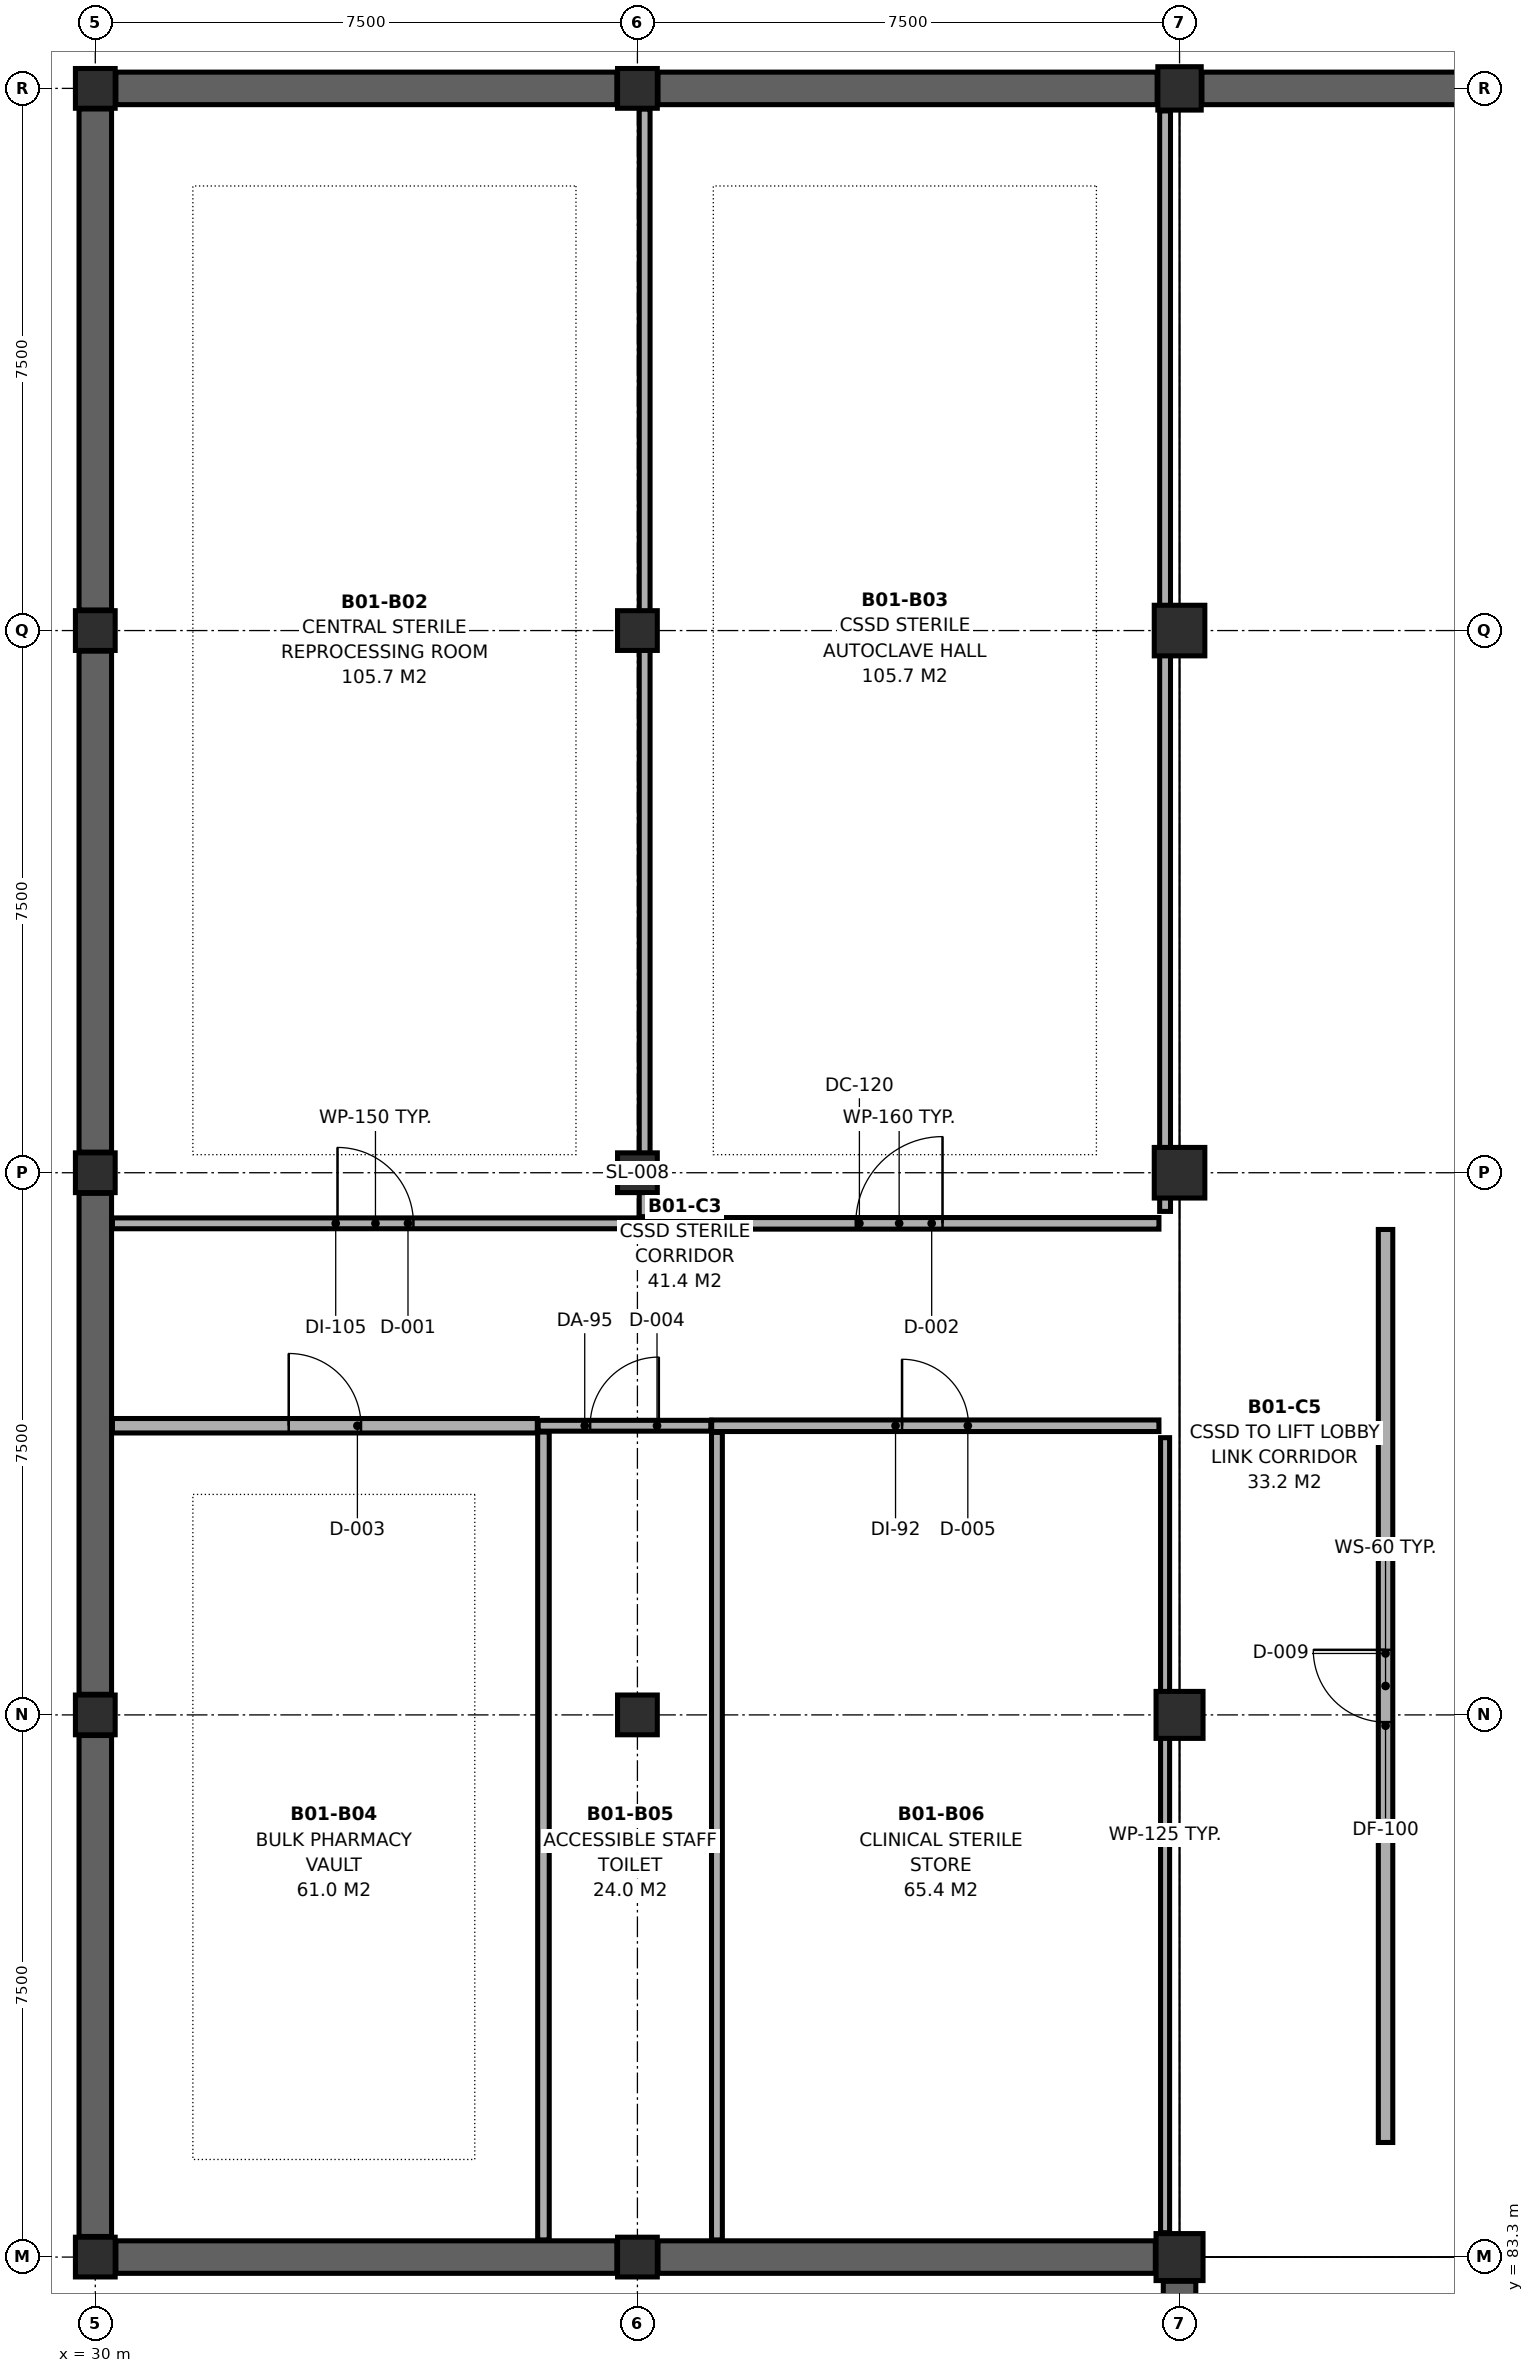
"""IFC4 building model, lengths in metres.
Left out: names, types, materials, properties, quantities, classifications, styles, units other than length and angle.
Written with IfcOpenShell. Run it as: python <this file> out.ifc"""

import sys

from ifc_helpers import new_model, si_unit, direction, frame, frame_2d, origin, origin_2d, place, context, subcontext, project, spatial, rectangle, extrude, element, fill, save


model = new_model("IFC4")
c1 = context("Model", 3, precision=1e-05, world=origin(), true_north=direction((0.0, 1.0)))
c2 = subcontext(c1, "Body", "Model", "MODEL_VIEW")
j1 = project(units=[si_unit("LENGTHUNIT", "METRE"), si_unit("PLANEANGLEUNIT", "RADIAN")], contexts=[c1])
p1 = place(None, origin())
s1 = spatial("IfcSite", under=j1, at=p1, CompositionType="ELEMENT")
p2 = place(p1, origin())
s2 = spatial("IfcBuilding", under=s1, at=p2, CompositionType="ELEMENT")
p3 = place(p2, frame((0.0, 0.0, -4.2)))
s3 = spatial("IfcBuildingStorey", under=s2, at=p3, CompositionType="ELEMENT", Elevation=-4.2)
for number, where, z_axis, x_axis in (
    (1, (30.0, 83.3, 0.0), (0.0, 0.0, 1.0), (1.0, 0.0, 0.0)),
    (2, (30.0, 90.8, 0.0), (0.0, 0.0, 1.0), (1.0, 0.0, 0.0)),
    (3, (30.0, 98.3, 0.0), (0.0, 0.0, 1.0), (1.0, 0.0, 0.0)),
    (4, (30.0, 105.8, 0.0), (0.0, 0.0, 1.0), (1.0, 0.0, 0.0)),
    (5, (30.0, 113.3, 0.0), (0.0, 0.0, 1.0), (1.0, 0.0, 0.0)),
    (6, (37.5, 83.3, 0.0), (0.0, 0.0, 1.0), (1.0, 0.0, 0.0)),
    (7, (37.5, 90.8, 0.0), (0.0, 0.0, 1.0), (1.0, 0.0, 0.0)),
    (8, (37.5, 98.3, 0.0), (0.0, 0.0, 1.0), (1.0, 0.0, 0.0)),
    (9, (37.5, 105.8, 0.0), (0.0, 0.0, 1.0), (1.0, 0.0, 0.0)),
    (10, (37.5, 113.3, 0.0), (0.0, 0.0, 1.0), (1.0, 0.0, 0.0)),
):
    element("IfcColumn", number, at=place(p3, frame(where, z_axis=z_axis, x_axis=x_axis)), inside=s3, PredefinedType="COLUMN", context=c2, shape_type="SweptSolid", body=[
        extrude(rectangle(XDim=0.55, YDim=0.55, at=origin_2d()), origin(), (0.0, 0.0, 1.0), 3.78),
    ])
for number, where, z_axis, x_axis in (
    (11, (45.0, 83.3, 0.0), (0.0, 0.0, 1.0), (1.0, 0.0, 0.0)),
    (12, (45.0, 90.8, 0.0), (0.0, 0.0, 1.0), (1.0, 0.0, 0.0)),
):
    element("IfcColumn", number, at=place(p3, frame(where, z_axis=z_axis, x_axis=x_axis)), inside=s3, PredefinedType="COLUMN", context=c2, shape_type="SweptSolid", body=[
        extrude(rectangle(XDim=0.65, YDim=0.65, at=origin_2d()), origin(), (0.0, 0.0, 1.0), 3.78),
    ])
for number, where, z_axis, x_axis in (
    (13, (45.0, 98.3, 0.0), (0.0, 0.0, 1.0), (1.0, 0.0, 0.0)),
    (14, (45.0, 105.8, 0.0), (0.0, 0.0, 1.0), (1.0, 0.0, 0.0)),
):
    element("IfcColumn", number, at=place(p3, frame(where, z_axis=z_axis, x_axis=x_axis)), inside=s3, PredefinedType="COLUMN", context=c2, shape_type="SweptSolid", body=[
        extrude(rectangle(XDim=0.7, YDim=0.7, at=origin_2d()), origin(), (0.0, 0.0, 1.0), 3.78),
    ])
p4 = place(p3, frame((45.0, 113.3, 0.0), z_axis=(0.0, 0.0, 1.0), x_axis=(1.0, 0.0, 0.0)))
e15 = element("IfcColumn", 15, at=p4, inside=s3, PredefinedType="COLUMN", context=c2, shape_type="SweptSolid", body=[
    extrude(rectangle(XDim=0.6, YDim=0.6, at=origin_2d()), origin(), (0.0, 0.0, 1.0), 3.78),
])
p5 = place(p3, frame((45.0, 76.11, 0.0), z_axis=(0.0, 0.0, 1.0), x_axis=(0.0, 1.0, 0.0)))
e16 = element("IfcWall", 16, at=p5, inside=s3, PredefinedType="USERDEFINED", context=c2, shape_type="SweptSolid", body=[
    extrude(rectangle(XDim=6.855, YDim=0.45, at=frame_2d((3.427, 0.0))), origin(), (0.0, 0.0, 1.0), 3.13),
])
p6 = place(p3, frame((44.665, 83.3, 0.0), z_axis=(0.0, 0.0, 1.0), x_axis=(-1.0, 0.0, 0.0)))
e17 = element("IfcWall", 17, at=p6, inside=s3, PredefinedType="USERDEFINED", context=c2, shape_type="SweptSolid", body=[
    extrude(rectangle(XDim=6.88, YDim=0.45, at=frame_2d((3.44, 0.0))), origin(), (0.0, 0.0, 1.0), 3.13),
])
p7 = place(p3, frame((37.215, 83.3, 0.0), z_axis=(0.0, 0.0, 1.0), x_axis=(-1.0, 0.0, 0.0)))
e18 = element("IfcWall", 18, at=p7, inside=s3, PredefinedType="USERDEFINED", context=c2, shape_type="SweptSolid", body=[
    extrude(rectangle(XDim=6.93, YDim=0.45, at=frame_2d((3.465, 0.0))), origin(), (0.0, 0.0, 1.0), 3.13),
])
for number, where, z_axis, x_axis in (
    (19, (30.0, 83.585, 0.0), (0.0, 0.0, 1.0), (0.0, 1.0, 0.0)),
    (20, (30.0, 91.085, 0.0), (0.0, 0.0, 1.0), (0.0, 1.0, 0.0)),
    (21, (30.0, 98.585, 0.0), (0.0, 0.0, 1.0), (0.0, 1.0, 0.0)),
    (22, (30.0, 106.085, 0.0), (0.0, 0.0, 1.0), (0.0, 1.0, 0.0)),
):
    element("IfcWall", number, at=place(p3, frame(where, z_axis=z_axis, x_axis=x_axis)), inside=s3, PredefinedType="USERDEFINED", context=c2, shape_type="SweptSolid", body=[
        extrude(rectangle(XDim=6.93, YDim=0.45, at=frame_2d((3.465, 0.0))), origin(), (0.0, 0.0, 1.0), 3.13),
    ])
p8 = place(p3, frame((30.285, 113.3, 0.0), z_axis=(0.0, 0.0, 1.0), x_axis=(1.0, 0.0, 0.0)))
e23 = element("IfcWall", 23, at=p8, inside=s3, PredefinedType="USERDEFINED", context=c2, shape_type="SweptSolid", body=[
    extrude(rectangle(XDim=6.93, YDim=0.45, at=frame_2d((3.465, 0.0))), origin(), (0.0, 0.0, 1.0), 3.13),
])
p9 = place(p3, frame((37.785, 113.3, 0.0), z_axis=(0.0, 0.0, 1.0), x_axis=(1.0, 0.0, 0.0)))
e24 = element("IfcWall", 24, at=p9, inside=s3, PredefinedType="USERDEFINED", context=c2, shape_type="SweptSolid", body=[
    extrude(rectangle(XDim=6.905, YDim=0.45, at=frame_2d((3.453, 0.0))), origin(), (0.0, 0.0, 1.0), 3.13),
])
p10 = place(p3, frame((45.31, 113.3, 0.0), z_axis=(0.0, 0.0, 1.0), x_axis=(1.0, 0.0, 0.0)))
e25 = element("IfcWall", 25, at=p10, inside=s3, PredefinedType="USERDEFINED", context=c2, shape_type="SweptSolid", body=[
    extrude(rectangle(XDim=6.88, YDim=0.45, at=frame_2d((3.44, 0.0))), origin(), (0.0, 0.0, 1.0), 3.13),
])
p11 = place(p3, frame((47.85, 84.885, 0.0), z_axis=(0.0, 0.0, 1.0), x_axis=(0.0, 1.0, 0.0)))
e26 = element("IfcWall", 26, at=p11, inside=s3, PredefinedType="PARTITIONING", context=c2, shape_type="SweptSolid", body=[
    extrude(rectangle(XDim=12.63, YDim=0.2, at=frame_2d((6.315, 0.0))), origin(), (0.0, 0.0, 1.0), 3.065),
])
p12 = place(p11, frame((5.815, 0.0, 0.0)))
e27 = element("IfcOpeningElement", 27, at=p12, cuts=e26, PredefinedType="OPENING", context=c2, shape_type="SweptSolid", body=[
    extrude(rectangle(XDim=1.0, YDim=2.15, at=frame_2d((0.5, 1.075))), frame((0.0, 0.112, 0.0), z_axis=(0.0, -1.0, 0.0), x_axis=(1.0, 0.0, 0.0)), (0.0, 0.0, 1.0), 0.224),
])
p13 = place(p3, frame((30.237, 97.6, 0.0), z_axis=(0.0, 0.0, 1.0), x_axis=(1.0, 0.0, 0.0)))
e28 = element("IfcWall", 28, at=p13, inside=s3, PredefinedType="PARTITIONING", context=c2, shape_type="SweptSolid", body=[
    extrude(rectangle(XDim=7.278, YDim=0.15, at=frame_2d((3.639, 0.0))), origin(), (0.0, 0.0, 1.0), 3.065),
])
p14 = place(p13, frame((3.114, 0.0, 0.0)))
e29 = element("IfcOpeningElement", 29, at=p14, cuts=e28, PredefinedType="OPENING", context=c2, shape_type="SweptSolid", body=[
    extrude(rectangle(XDim=1.05, YDim=2.15, at=frame_2d((0.525, 1.075))), frame((0.0, 0.087, 0.0), z_axis=(0.0, -1.0, 0.0), x_axis=(1.0, 0.0, 0.0)), (0.0, 0.0, 1.0), 0.174),
])
p15 = place(p3, frame((37.527, 97.6, 0.0), z_axis=(0.0, 0.0, 1.0), x_axis=(1.0, 0.0, 0.0)))
e30 = element("IfcWall", 30, at=p15, inside=s3, PredefinedType="PARTITIONING", context=c2, shape_type="SweptSolid", body=[
    extrude(rectangle(XDim=7.188, YDim=0.16, at=frame_2d((3.594, 0.0))), origin(), (0.0, 0.0, 1.0), 3.065),
])
p16 = place(p15, frame((2.994, 0.0, 0.0)))
e31 = element("IfcOpeningElement", 31, at=p16, cuts=e30, PredefinedType="OPENING", context=c2, shape_type="SweptSolid", body=[
    extrude(rectangle(XDim=1.2, YDim=2.15, at=frame_2d((0.6, 1.075))), frame((0.0, 0.092, 0.0), z_axis=(0.0, -1.0, 0.0), x_axis=(1.0, 0.0, 0.0)), (0.0, 0.0, 1.0), 0.184),
])
p17 = place(p3, frame((30.237, 94.8, 0.0), z_axis=(0.0, 0.0, 1.0), x_axis=(1.0, 0.0, 0.0)))
e32 = element("IfcWall", 32, at=p17, inside=s3, PredefinedType="PARTITIONING", context=c2, shape_type="SweptSolid", body=[
    extrude(rectangle(XDim=5.878, YDim=0.2, at=frame_2d((2.939, 0.0))), origin(), (0.0, 0.0, 1.0), 3.115),
])
p18 = place(p17, frame((2.439, 0.0, 0.0)))
e33 = element("IfcOpeningElement", 33, at=p18, cuts=e32, PredefinedType="OPENING", context=c2, shape_type="SweptSolid", body=[
    extrude(rectangle(XDim=1.0, YDim=2.15, at=frame_2d((0.5, 1.075))), frame((0.0, 0.112, 0.0), z_axis=(0.0, -1.0, 0.0), x_axis=(1.0, 0.0, 0.0)), (0.0, 0.0, 1.0), 0.224),
])
p19 = place(p3, frame((36.127, 94.8, 0.0), z_axis=(0.0, 0.0, 1.0), x_axis=(1.0, 0.0, 0.0)))
e34 = element("IfcWall", 34, at=p19, inside=s3, PredefinedType="PARTITIONING", context=c2, shape_type="SweptSolid", body=[
    extrude(rectangle(XDim=2.388, YDim=0.15, at=frame_2d((1.194, 0.0))), origin(), (0.0, 0.0, 1.0), 3.065),
])
p20 = place(p19, frame((0.719, 0.0, 0.0)))
e35 = element("IfcOpeningElement", 35, at=p20, cuts=e34, PredefinedType="OPENING", context=c2, shape_type="SweptSolid", body=[
    extrude(rectangle(XDim=0.95, YDim=2.15, at=frame_2d((0.475, 1.075))), frame((0.0, 0.087, 0.0), z_axis=(0.0, -1.0, 0.0), x_axis=(1.0, 0.0, 0.0)), (0.0, 0.0, 1.0), 0.174),
])
p21 = place(p3, frame((38.527, 94.8, 0.0), z_axis=(0.0, 0.0, 1.0), x_axis=(1.0, 0.0, 0.0)))
e36 = element("IfcWall", 36, at=p21, inside=s3, PredefinedType="PARTITIONING", context=c2, shape_type="SweptSolid", body=[
    extrude(rectangle(XDim=6.188, YDim=0.16, at=frame_2d((3.094, 0.0))), origin(), (0.0, 0.0, 1.0), 3.065),
])
p22 = place(p21, frame((2.634, 0.0, 0.0)))
e37 = element("IfcOpeningElement", 37, at=p22, cuts=e36, PredefinedType="OPENING", context=c2, shape_type="SweptSolid", body=[
    extrude(rectangle(XDim=0.92, YDim=2.1, at=frame_2d((0.46, 1.05))), frame((0.0, 0.092, 0.0), z_axis=(0.0, -1.0, 0.0), x_axis=(1.0, 0.0, 0.0)), (0.0, 0.0, 1.0), 0.184),
])
p23 = place(p3, frame((37.6, 97.692, 0.0), z_axis=(0.0, 0.0, 1.0), x_axis=(0.0, 1.0, 0.0)))
e38 = element("IfcWall", 38, at=p23, inside=s3, PredefinedType="PARTITIONING", context=c2, shape_type="SweptSolid", body=[
    extrude(rectangle(XDim=15.321, YDim=0.15, at=frame_2d((7.661, 0.0))), origin(), (0.0, 0.0, 1.0), 3.065),
])
p24 = place(p3, frame((44.8, 97.765, 0.0), z_axis=(0.0, 0.0, 1.0), x_axis=(0.0, 1.0, 0.0)))
e39 = element("IfcWall", 39, at=p24, inside=s3, PredefinedType="PARTITIONING", context=c2, shape_type="SweptSolid", body=[
    extrude(rectangle(XDim=15.223, YDim=0.15, at=frame_2d((7.612, 0.0))), origin(), (0.0, 0.0, 1.0), 3.065),
])
p25 = place(p3, frame((36.2, 83.537, 0.0), z_axis=(0.0, 0.0, 1.0), x_axis=(0.0, 1.0, 0.0)))
e40 = element("IfcWall", 40, at=p25, inside=s3, PredefinedType="PARTITIONING", context=c2, shape_type="SweptSolid", body=[
    extrude(rectangle(XDim=11.176, YDim=0.16, at=frame_2d((5.588, 0.0))), origin(), (0.0, 0.0, 1.0), 3.065),
])
p26 = place(p3, frame((38.6, 83.537, 0.0), z_axis=(0.0, 0.0, 1.0), x_axis=(0.0, 1.0, 0.0)))
e41 = element("IfcWall", 41, at=p26, inside=s3, PredefinedType="PARTITIONING", context=c2, shape_type="SweptSolid", body=[
    extrude(rectangle(XDim=11.171, YDim=0.15, at=frame_2d((5.585, 0.0))), origin(), (0.0, 0.0, 1.0), 3.065),
])
p27 = place(p3, frame((44.8, 83.637, 0.0), z_axis=(0.0, 0.0, 1.0), x_axis=(0.0, 1.0, 0.0)))
e42 = element("IfcWall", 42, at=p27, inside=s3, PredefinedType="PARTITIONING", context=c2, shape_type="SweptSolid", body=[
    extrude(rectangle(XDim=10.998, YDim=0.125, at=frame_2d((5.499, 0.0))), origin(), (0.0, 0.0, 1.0), 3.065),
])
p28 = place(p12, origin())
e43 = element("IfcDoor", 43, at=p28, inside=s3, OperationType="SINGLE_SWING_RIGHT", PredefinedType="DOOR", context=c2, shape_type="SweptSolid", body=[
    extrude(rectangle(XDim=1.0, YDim=2.15, at=frame_2d((0.5, 1.075))), frame((0.0, 0.025, 0.0), z_axis=(0.0, -1.0, 0.0), x_axis=(1.0, 0.0, 0.0)), (0.0, 0.0, 1.0), 0.05),
])
fill(e27, e43)
p29 = place(p14, origin())
e44 = element("IfcDoor", 44, at=p29, inside=s3, OperationType="SINGLE_SWING_LEFT", PredefinedType="DOOR", context=c2, shape_type="SweptSolid", body=[
    extrude(rectangle(XDim=1.05, YDim=2.15, at=frame_2d((0.525, 1.075))), frame((0.0, 0.025, 0.0), z_axis=(0.0, -1.0, 0.0), x_axis=(1.0, 0.0, 0.0)), (0.0, 0.0, 1.0), 0.05),
])
fill(e29, e44)
p30 = place(p16, origin())
e45 = element("IfcDoor", 45, at=p30, inside=s3, OperationType="SINGLE_SWING_RIGHT", PredefinedType="DOOR", context=c2, shape_type="SweptSolid", body=[
    extrude(rectangle(XDim=1.2, YDim=2.15, at=frame_2d((0.6, 1.075))), frame((0.0, 0.025, 0.0), z_axis=(0.0, -1.0, 0.0), x_axis=(1.0, 0.0, 0.0)), (0.0, 0.0, 1.0), 0.05),
])
fill(e31, e45)
p31 = place(p18, origin())
e46 = element("IfcDoor", 46, at=p31, inside=s3, OperationType="SINGLE_SWING_LEFT", PredefinedType="DOOR", context=c2, shape_type="SweptSolid", body=[
    extrude(rectangle(XDim=1.0, YDim=2.15, at=frame_2d((0.5, 1.075))), frame((0.0, 0.025, 0.0), z_axis=(0.0, -1.0, 0.0), x_axis=(1.0, 0.0, 0.0)), (0.0, 0.0, 1.0), 0.05),
])
fill(e33, e46)
p32 = place(p20, origin())
e47 = element("IfcDoor", 47, at=p32, inside=s3, OperationType="SINGLE_SWING_RIGHT", PredefinedType="DOOR", context=c2, shape_type="SweptSolid", body=[
    extrude(rectangle(XDim=0.95, YDim=2.15, at=frame_2d((0.475, 1.075))), frame((0.0, 0.025, 0.0), z_axis=(0.0, -1.0, 0.0), x_axis=(1.0, 0.0, 0.0)), (0.0, 0.0, 1.0), 0.05),
])
fill(e35, e47)
p33 = place(p22, origin())
e48 = element("IfcDoor", 48, at=p33, inside=s3, OperationType="SINGLE_SWING_LEFT", PredefinedType="DOOR", context=c2, shape_type="SweptSolid", body=[
    extrude(rectangle(XDim=0.92, YDim=2.1, at=frame_2d((0.46, 1.05))), frame((0.0, 0.025, 0.0), z_axis=(0.0, -1.0, 0.0), x_axis=(1.0, 0.0, 0.0)), (0.0, 0.0, 1.0), 0.05),
])
fill(e37, e48)
save(model, sys.argv[1])
